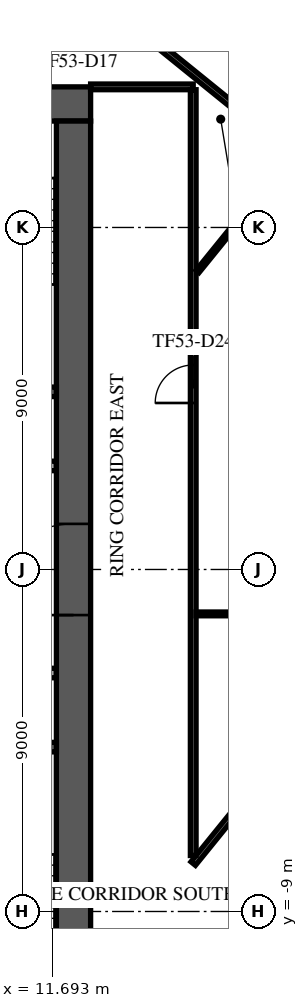
"""IFC4 building model, lengths in metres.
Left out: names, types, materials, properties, quantities, classifications, styles, units other than length and angle.
Written with IfcOpenShell. Run it as: python <this file> out.ifc"""

import sys

from ifc_helpers import new_model, si_unit, direction, frame, frame_2d, origin, place, context, subcontext, project, spatial, rectangle, extrude, element, fill, save


model = new_model("IFC4")
c1 = context("Model", 3, precision=1e-05, world=origin(), true_north=direction((0.0, 1.0)))
c2 = subcontext(c1, "Body", "Model", "MODEL_VIEW")
j1 = project(units=[si_unit("LENGTHUNIT", "METRE"), si_unit("PLANEANGLEUNIT", "RADIAN")], contexts=[c1])
p1 = place(None, origin())
s1 = spatial("IfcSite", under=j1, at=p1, CompositionType="ELEMENT")
p2 = place(p1, origin())
s2 = spatial("IfcBuilding", under=s1, at=p2, CompositionType="ELEMENT")
p3 = place(p2, frame((0.0, 0.0, 225.3)))
s3 = spatial("IfcBuildingStorey", under=s2, at=p3, CompositionType="ELEMENT", Elevation=225.3)
p4 = place(p3, frame((-12.7, 12.25, 0.0), z_axis=(0.0, 0.0, 1.0), x_axis=(1.0, 0.0, 0.0)))
e1 = element("IfcWall", 1, at=p4, inside=s3, PredefinedType="SHEAR", context=c2, shape_type="SweptSolid", body=[
    extrude(rectangle(XDim=25.4, YDim=0.9, at=frame_2d((12.7, 0.0))), origin(), (0.0, 0.0, 1.0), 3.62),
])
p5 = place(p4, frame((11.5, 0.0, 0.0)))
e2 = element("IfcOpeningElement", 2, at=p5, cuts=e1, PredefinedType="OPENING", context=c2, shape_type="SweptSolid", body=[
    extrude(rectangle(XDim=2.4, YDim=2.4, at=frame_2d((1.2, 1.2))), frame((0.0, 0.46, 0.0), z_axis=(0.0, -1.0, 0.0), x_axis=(1.0, 0.0, 0.0)), (0.0, 0.0, 1.0), 0.92),
])
p6 = place(p4, frame((22.325, 0.0, 0.0)))
e3 = element("IfcOpeningElement", 3, at=p6, cuts=e1, PredefinedType="OPENING", context=c2, shape_type="SweptSolid", body=[
    extrude(rectangle(XDim=1.2, YDim=2.1, at=frame_2d((0.6, 1.05))), frame((0.0, 0.46, 0.0), z_axis=(0.0, -1.0, 0.0), x_axis=(1.0, 0.0, 0.0)), (0.0, 0.0, 1.0), 0.92),
])
p7 = place(p4, frame((1.3, 0.0, 0.0)))
e4 = element("IfcOpeningElement", 4, at=p7, cuts=e1, PredefinedType="OPENING", context=c2, shape_type="SweptSolid", body=[
    extrude(rectangle(XDim=1.0, YDim=2.1, at=frame_2d((0.5, 1.05))), frame((0.0, 0.46, 0.0), z_axis=(0.0, -1.0, 0.0), x_axis=(1.0, 0.0, 0.0)), (0.0, 0.0, 1.0), 0.92),
])
p8 = place(p3, frame((12.25, -11.8, 0.0), z_axis=(0.0, 0.0, 1.0), x_axis=(0.0, 1.0, 0.0)))
e5 = element("IfcWall", 5, at=p8, inside=s3, PredefinedType="SHEAR", context=c2, shape_type="SweptSolid", body=[
    extrude(rectangle(XDim=23.6, YDim=0.9, at=frame_2d((11.8, 0.0))), origin(), (0.0, 0.0, 1.0), 3.62),
])
p9 = place(p8, frame((10.6, 0.0, 0.0)))
e6 = element("IfcOpeningElement", 6, at=p9, cuts=e5, PredefinedType="OPENING", context=c2, shape_type="SweptSolid", body=[
    extrude(rectangle(XDim=2.4, YDim=2.4, at=frame_2d((1.2, 1.2))), frame((0.0, 0.46, 0.0), z_axis=(0.0, -1.0, 0.0), x_axis=(1.0, 0.0, 0.0)), (0.0, 0.0, 1.0), 0.92),
])
for number, where, z_axis, x_axis in (
    (7, (8.65, 4.675, 0.0), (0.0, 0.0, 1.0), (1.0, 0.0, 0.0)),
    (8, (8.65, -4.675, 0.0), (0.0, 0.0, 1.0), (1.0, 0.0, 0.0)),
):
    element("IfcWall", number, at=place(p3, frame(where, z_axis=z_axis, x_axis=x_axis)), inside=s3, PredefinedType="SOLIDWALL", context=c2, shape_type="SweptSolid", body=[
        extrude(rectangle(XDim=3.15, YDim=0.25, at=frame_2d((1.575, 0.0))), origin(), (0.0, 0.0, 1.0), 3.62),
    ])
p10 = place(p3, frame((5.63, -2.725, 0.0), z_axis=(0.0, 0.0, 1.0), x_axis=(1.0, 0.0, 0.0)))
e9 = element("IfcWall", 9, at=p10, inside=s3, PredefinedType="PARTITIONING", context=c2, shape_type="SweptSolid", body=[
    extrude(rectangle(XDim=6.165, YDim=0.25, at=frame_2d((3.083, 0.0))), origin(), (0.0, 0.0, 1.0), 3.62),
])
p11 = place(p10, frame((0.745, 0.0, 0.0)))
e10 = element("IfcOpeningElement", 10, at=p11, cuts=e9, PredefinedType="OPENING", context=c2, shape_type="SweptSolid", body=[
    extrude(rectangle(XDim=1.0, YDim=2.1, at=frame_2d((0.5, 1.05))), frame((0.0, 0.135, 0.0), z_axis=(0.0, -1.0, 0.0), x_axis=(1.0, 0.0, 0.0)), (0.0, 0.0, 1.0), 0.27),
])
p12 = place(p10, frame((3.92, 0.0, 0.0)))
e11 = element("IfcOpeningElement", 11, at=p12, cuts=e9, PredefinedType="OPENING", context=c2, shape_type="SweptSolid", body=[
    extrude(rectangle(XDim=0.9, YDim=2.1, at=frame_2d((0.45, 1.05))), frame((0.0, 0.135, 0.0), z_axis=(0.0, -1.0, 0.0), x_axis=(1.0, 0.0, 0.0)), (0.0, 0.0, 1.0), 0.27),
])
p13 = place(p3, frame((8.38, 2.725, 0.0), z_axis=(0.0, 0.0, 1.0), x_axis=(1.0, 0.0, 0.0)))
e12 = element("IfcWall", 12, at=p13, inside=s3, PredefinedType="PARTITIONING", context=c2, shape_type="SweptSolid", body=[
    extrude(rectangle(XDim=3.415, YDim=0.25, at=frame_2d((1.708, 0.0))), origin(), (0.0, 0.0, 1.0), 3.62),
])
p14 = place(p13, frame((1.17, 0.0, 0.0)))
e13 = element("IfcOpeningElement", 13, at=p14, cuts=e12, PredefinedType="OPENING", context=c2, shape_type="SweptSolid", body=[
    extrude(rectangle(XDim=0.9, YDim=2.1, at=frame_2d((0.45, 1.05))), frame((0.0, 0.135, 0.0), z_axis=(0.0, -1.0, 0.0), x_axis=(1.0, 0.0, 0.0)), (0.0, 0.0, 1.0), 0.27),
])
p15 = place(p3, frame((3.777, -34.584, 0.0), z_axis=(0.0, 0.0, 1.0), x_axis=(0.629323778295, 0.777143218508, 0.0)))
e14 = element("IfcWall", 14, at=p15, inside=s3, PredefinedType="STANDARD", context=c2, shape_type="SweptSolid", body=[
    extrude(rectangle(XDim=49.0, YDim=0.6, at=frame_2d((24.5, 0.0))), origin(), (0.0, 0.0, 1.0), 3.62),
])
p16 = place(p15, frame((1.227, 0.0, 0.9)))
e15 = element("IfcOpeningElement", 15, at=p16, cuts=e14, PredefinedType="OPENING", context=c2, shape_type="SweptSolid", body=[
    extrude(rectangle(XDim=2.0, YDim=2.1, at=frame_2d((1.0, 1.05))), frame((0.0, 0.31, 0.0), z_axis=(0.0, -1.0, 0.0), x_axis=(1.0, 0.0, 0.0)), (0.0, 0.0, 1.0), 0.62),
])
p17 = place(p15, frame((5.682, 0.0, 0.9)))
e16 = element("IfcOpeningElement", 16, at=p17, cuts=e14, PredefinedType="OPENING", context=c2, shape_type="SweptSolid", body=[
    extrude(rectangle(XDim=2.0, YDim=2.1, at=frame_2d((1.0, 1.05))), frame((0.0, 0.31, 0.0), z_axis=(0.0, -1.0, 0.0), x_axis=(1.0, 0.0, 0.0)), (0.0, 0.0, 1.0), 0.62),
])
p18 = place(p15, frame((10.136, 0.0, 0.9)))
e17 = element("IfcOpeningElement", 17, at=p18, cuts=e14, PredefinedType="OPENING", context=c2, shape_type="SweptSolid", body=[
    extrude(rectangle(XDim=2.0, YDim=2.1, at=frame_2d((1.0, 1.05))), frame((0.0, 0.31, 0.0), z_axis=(0.0, -1.0, 0.0), x_axis=(1.0, 0.0, 0.0)), (0.0, 0.0, 1.0), 0.62),
])
p19 = place(p15, frame((14.591, 0.0, 0.9)))
e18 = element("IfcOpeningElement", 18, at=p19, cuts=e14, PredefinedType="OPENING", context=c2, shape_type="SweptSolid", body=[
    extrude(rectangle(XDim=2.0, YDim=2.1, at=frame_2d((1.0, 1.05))), frame((0.0, 0.31, 0.0), z_axis=(0.0, -1.0, 0.0), x_axis=(1.0, 0.0, 0.0)), (0.0, 0.0, 1.0), 0.62),
])
p20 = place(p15, frame((19.045, 0.0, 0.9)))
e19 = element("IfcOpeningElement", 19, at=p20, cuts=e14, PredefinedType="OPENING", context=c2, shape_type="SweptSolid", body=[
    extrude(rectangle(XDim=2.0, YDim=2.1, at=frame_2d((1.0, 1.05))), frame((0.0, 0.31, 0.0), z_axis=(0.0, -1.0, 0.0), x_axis=(1.0, 0.0, 0.0)), (0.0, 0.0, 1.0), 0.62),
])
p21 = place(p15, frame((23.5, 0.0, 0.9)))
e20 = element("IfcOpeningElement", 20, at=p21, cuts=e14, PredefinedType="OPENING", context=c2, shape_type="SweptSolid", body=[
    extrude(rectangle(XDim=2.0, YDim=2.1, at=frame_2d((1.0, 1.05))), frame((0.0, 0.31, 0.0), z_axis=(0.0, -1.0, 0.0), x_axis=(1.0, 0.0, 0.0)), (0.0, 0.0, 1.0), 0.62),
])
p22 = place(p15, frame((27.955, 0.0, 0.9)))
e21 = element("IfcOpeningElement", 21, at=p22, cuts=e14, PredefinedType="OPENING", context=c2, shape_type="SweptSolid", body=[
    extrude(rectangle(XDim=2.0, YDim=2.1, at=frame_2d((1.0, 1.05))), frame((0.0, 0.31, 0.0), z_axis=(0.0, -1.0, 0.0), x_axis=(1.0, 0.0, 0.0)), (0.0, 0.0, 1.0), 0.62),
])
p23 = place(p15, frame((32.409, 0.0, 0.9)))
e22 = element("IfcOpeningElement", 22, at=p23, cuts=e14, PredefinedType="OPENING", context=c2, shape_type="SweptSolid", body=[
    extrude(rectangle(XDim=2.0, YDim=2.1, at=frame_2d((1.0, 1.05))), frame((0.0, 0.31, 0.0), z_axis=(0.0, -1.0, 0.0), x_axis=(1.0, 0.0, 0.0)), (0.0, 0.0, 1.0), 0.62),
])
p24 = place(p15, frame((36.864, 0.0, 0.9)))
e23 = element("IfcOpeningElement", 23, at=p24, cuts=e14, PredefinedType="OPENING", context=c2, shape_type="SweptSolid", body=[
    extrude(rectangle(XDim=2.0, YDim=2.1, at=frame_2d((1.0, 1.05))), frame((0.0, 0.31, 0.0), z_axis=(0.0, -1.0, 0.0), x_axis=(1.0, 0.0, 0.0)), (0.0, 0.0, 1.0), 0.62),
])
p25 = place(p15, frame((41.318, 0.0, 0.9)))
e24 = element("IfcOpeningElement", 24, at=p25, cuts=e14, PredefinedType="OPENING", context=c2, shape_type="SweptSolid", body=[
    extrude(rectangle(XDim=2.0, YDim=2.1, at=frame_2d((1.0, 1.05))), frame((0.0, 0.31, 0.0), z_axis=(0.0, -1.0, 0.0), x_axis=(1.0, 0.0, 0.0)), (0.0, 0.0, 1.0), 0.62),
])
p26 = place(p15, frame((45.773, 0.0, 0.9)))
e25 = element("IfcOpeningElement", 25, at=p26, cuts=e14, PredefinedType="OPENING", context=c2, shape_type="SweptSolid", body=[
    extrude(rectangle(XDim=2.0, YDim=2.1, at=frame_2d((1.0, 1.05))), frame((0.0, 0.31, 0.0), z_axis=(0.0, -1.0, 0.0), x_axis=(1.0, 0.0, 0.0)), (0.0, 0.0, 1.0), 0.62),
])
p27 = place(p3, frame((33.845, 10.81, 0.0), z_axis=(0.0, 0.0, 1.0), x_axis=(-0.777145437972, 0.629321037499, 0.0)))
e26 = element("IfcWall", 26, at=p27, inside=s3, PredefinedType="STANDARD", context=c2, shape_type="SweptSolid", body=[
    extrude(rectangle(XDim=39.0, YDim=0.6, at=frame_2d((19.5, 0.0))), origin(), (0.0, 0.0, 1.0), 3.62),
])
p28 = place(p27, frame((1.217, 0.0, 0.9)))
e27 = element("IfcOpeningElement", 27, at=p28, cuts=e26, PredefinedType="OPENING", context=c2, shape_type="SweptSolid", body=[
    extrude(rectangle(XDim=1.9, YDim=2.1, at=frame_2d((0.95, 1.05))), frame((0.0, 0.31, 0.0), z_axis=(0.0, -1.0, 0.0), x_axis=(1.0, 0.0, 0.0)), (0.0, 0.0, 1.0), 0.62),
])
p29 = place(p27, frame((5.55, 0.0, 0.9)))
e28 = element("IfcOpeningElement", 28, at=p29, cuts=e26, PredefinedType="OPENING", context=c2, shape_type="SweptSolid", body=[
    extrude(rectangle(XDim=1.9, YDim=2.1, at=frame_2d((0.95, 1.05))), frame((0.0, 0.31, 0.0), z_axis=(0.0, -1.0, 0.0), x_axis=(1.0, 0.0, 0.0)), (0.0, 0.0, 1.0), 0.62),
])
p30 = place(p27, frame((9.883, 0.0, 0.9)))
e29 = element("IfcOpeningElement", 29, at=p30, cuts=e26, PredefinedType="OPENING", context=c2, shape_type="SweptSolid", body=[
    extrude(rectangle(XDim=1.9, YDim=2.1, at=frame_2d((0.95, 1.05))), frame((0.0, 0.31, 0.0), z_axis=(0.0, -1.0, 0.0), x_axis=(1.0, 0.0, 0.0)), (0.0, 0.0, 1.0), 0.62),
])
p31 = place(p27, frame((14.217, 0.0, 0.9)))
e30 = element("IfcOpeningElement", 30, at=p31, cuts=e26, PredefinedType="OPENING", context=c2, shape_type="SweptSolid", body=[
    extrude(rectangle(XDim=1.9, YDim=2.1, at=frame_2d((0.95, 1.05))), frame((0.0, 0.31, 0.0), z_axis=(0.0, -1.0, 0.0), x_axis=(1.0, 0.0, 0.0)), (0.0, 0.0, 1.0), 0.62),
])
p32 = place(p27, frame((18.55, 0.0, 0.9)))
e31 = element("IfcOpeningElement", 31, at=p32, cuts=e26, PredefinedType="OPENING", context=c2, shape_type="SweptSolid", body=[
    extrude(rectangle(XDim=1.9, YDim=2.1, at=frame_2d((0.95, 1.05))), frame((0.0, 0.31, 0.0), z_axis=(0.0, -1.0, 0.0), x_axis=(1.0, 0.0, 0.0)), (0.0, 0.0, 1.0), 0.62),
])
p33 = place(p27, frame((22.883, 0.0, 0.9)))
e32 = element("IfcOpeningElement", 32, at=p33, cuts=e26, PredefinedType="OPENING", context=c2, shape_type="SweptSolid", body=[
    extrude(rectangle(XDim=1.9, YDim=2.1, at=frame_2d((0.95, 1.05))), frame((0.0, 0.31, 0.0), z_axis=(0.0, -1.0, 0.0), x_axis=(1.0, 0.0, 0.0)), (0.0, 0.0, 1.0), 0.62),
])
p34 = place(p27, frame((27.217, 0.0, 0.9)))
e33 = element("IfcOpeningElement", 33, at=p34, cuts=e26, PredefinedType="OPENING", context=c2, shape_type="SweptSolid", body=[
    extrude(rectangle(XDim=1.9, YDim=2.1, at=frame_2d((0.95, 1.05))), frame((0.0, 0.31, 0.0), z_axis=(0.0, -1.0, 0.0), x_axis=(1.0, 0.0, 0.0)), (0.0, 0.0, 1.0), 0.62),
])
p35 = place(p27, frame((31.55, 0.0, 0.9)))
e34 = element("IfcOpeningElement", 34, at=p35, cuts=e26, PredefinedType="OPENING", context=c2, shape_type="SweptSolid", body=[
    extrude(rectangle(XDim=1.9, YDim=2.1, at=frame_2d((0.95, 1.05))), frame((0.0, 0.31, 0.0), z_axis=(0.0, -1.0, 0.0), x_axis=(1.0, 0.0, 0.0)), (0.0, 0.0, 1.0), 0.62),
])
p36 = place(p27, frame((35.883, 0.0, 0.9)))
e35 = element("IfcOpeningElement", 35, at=p36, cuts=e26, PredefinedType="OPENING", context=c2, shape_type="SweptSolid", body=[
    extrude(rectangle(XDim=1.9, YDim=2.1, at=frame_2d((0.95, 1.05))), frame((0.0, 0.31, 0.0), z_axis=(0.0, -1.0, 0.0), x_axis=(1.0, 0.0, 0.0)), (0.0, 0.0, 1.0), 0.62),
])
p37 = place(p3, frame((3.18, -26.643, 0.0), z_axis=(0.0, 0.0, 1.0), x_axis=(0.629322822444, 0.777143992547, 0.0)))
e36 = element("IfcWall", 36, at=p37, inside=s3, PredefinedType="PARTITIONING", context=c2, shape_type="SweptSolid", body=[
    extrude(rectangle(XDim=37.483, YDim=0.15, at=frame_2d((18.741, 0.0))), origin(), (0.0, 0.0, 1.0), 3.17),
])
p38 = place(p37, frame((6.346, 0.0, 0.0)))
e37 = element("IfcOpeningElement", 37, at=p38, cuts=e36, PredefinedType="OPENING", context=c2, shape_type="SweptSolid", body=[
    extrude(rectangle(XDim=1.0, YDim=2.1, at=frame_2d((0.5, 1.05))), frame((0.0, 0.085, 0.0), z_axis=(0.0, -1.0, 0.0), x_axis=(1.0, 0.0, 0.0)), (0.0, 0.0, 1.0), 0.17),
])
p39 = place(p37, frame((16.452, 0.0, 0.0)))
e38 = element("IfcOpeningElement", 38, at=p39, cuts=e36, PredefinedType="OPENING", context=c2, shape_type="SweptSolid", body=[
    extrude(rectangle(XDim=1.0, YDim=2.1, at=frame_2d((0.5, 1.05))), frame((0.0, 0.085, 0.0), z_axis=(0.0, -1.0, 0.0), x_axis=(1.0, 0.0, 0.0)), (0.0, 0.0, 1.0), 0.17),
])
p40 = place(p37, frame((23.4, 0.0, 0.0)))
e39 = element("IfcOpeningElement", 39, at=p40, cuts=e36, PredefinedType="OPENING", context=c2, shape_type="SweptSolid", body=[
    extrude(rectangle(XDim=1.0, YDim=2.1, at=frame_2d((0.5, 1.05))), frame((0.0, 0.085, 0.0), z_axis=(0.0, -1.0, 0.0), x_axis=(1.0, 0.0, 0.0)), (0.0, 0.0, 1.0), 0.17),
])
p41 = place(p3, frame((3.616, 25.688, 0.0), z_axis=(0.0, 0.0, 1.0), x_axis=(0.777137029952, -0.62933142038, 0.0)))
e40 = element("IfcWall", 40, at=p41, inside=s3, PredefinedType="PARTITIONING", context=c2, shape_type="SweptSolid", body=[
    extrude(rectangle(XDim=26.785, YDim=0.15, at=frame_2d((13.393, 0.0))), origin(), (0.0, 0.0, 1.0), 3.17),
])
p42 = place(p41, frame((12.682, 0.0, 0.0)))
e41 = element("IfcOpeningElement", 41, at=p42, cuts=e40, PredefinedType="OPENING", context=c2, shape_type="SweptSolid", body=[
    extrude(rectangle(XDim=1.0, YDim=2.1, at=frame_2d((0.5, 1.05))), frame((0.0, 0.085, 0.0), z_axis=(0.0, -1.0, 0.0), x_axis=(1.0, 0.0, 0.0)), (0.0, 0.0, 1.0), 0.17),
])
p43 = place(p41, frame((16.597, 0.0, 0.0)))
e42 = element("IfcOpeningElement", 42, at=p43, cuts=e40, PredefinedType="OPENING", context=c2, shape_type="SweptSolid", body=[
    extrude(rectangle(XDim=1.0, YDim=2.1, at=frame_2d((0.5, 1.05))), frame((0.0, 0.085, 0.0), z_axis=(0.0, -1.0, 0.0), x_axis=(1.0, 0.0, 0.0)), (0.0, 0.0, 1.0), 0.17),
])
p44 = place(p3, frame((10.553, 13.672, 0.0), z_axis=(0.0, 0.0, 1.0), x_axis=(0.629534094475, 0.776972859174, 0.0)))
e43 = element("IfcWall", 43, at=p44, inside=s3, PredefinedType="PARTITIONING", context=c2, shape_type="SweptSolid", body=[
    extrude(rectangle(XDim=2.572, YDim=0.15, at=frame_2d((1.286, 0.0))), origin(), (0.0, 0.0, 1.0), 3.17),
])
p45 = place(p44, frame((0.55, 0.0, 0.0)))
e44 = element("IfcOpeningElement", 44, at=p45, cuts=e43, PredefinedType="OPENING", context=c2, shape_type="SweptSolid", body=[
    extrude(rectangle(XDim=1.0, YDim=2.1, at=frame_2d((0.5, 1.05))), frame((0.0, 0.085, 0.0), z_axis=(0.0, -1.0, 0.0), x_axis=(1.0, 0.0, 0.0)), (0.0, 0.0, 1.0), 0.17),
])
p46 = place(p3, frame((12.172, 15.671, 0.0), z_axis=(0.0, 0.0, 1.0), x_axis=(0.777123609621, -0.629347992266, 0.0)))
e45 = element("IfcWall", 45, at=p46, inside=s3, PredefinedType="PARTITIONING", context=c2, shape_type="SweptSolid", body=[
    extrude(rectangle(XDim=13.833, YDim=0.15, at=frame_2d((6.917, 0.0))), origin(), (0.0, 0.0, 1.0), 3.17),
])
p47 = place(p46, frame((11.324, 0.0, 0.0)))
e46 = element("IfcOpeningElement", 46, at=p47, cuts=e45, PredefinedType="OPENING", context=c2, shape_type="SweptSolid", body=[
    extrude(rectangle(XDim=1.8, YDim=2.1, at=frame_2d((0.9, 1.05))), frame((0.0, 0.085, 0.0), z_axis=(0.0, -1.0, 0.0), x_axis=(1.0, 0.0, 0.0)), (0.0, 0.0, 1.0), 0.17),
])
p48 = place(p3, frame((12.7, 12.7, 0.0), z_axis=(0.0, 0.0, 1.0), x_axis=(1.0, 0.0, 0.0)))
e47 = element("IfcWall", 47, at=p48, inside=s3, PredefinedType="PARTITIONING", context=c2, shape_type="SweptSolid", body=[
    extrude(rectangle(XDim=2.7, YDim=0.15, at=frame_2d((1.35, 0.0))), origin(), (0.0, 0.0, 1.0), 3.17),
])
p49 = place(p3, frame((15.4, -7.739, 0.0), z_axis=(0.0, 0.0, 1.0), x_axis=(0.629348532184, 0.777123172373, 0.0)))
e48 = element("IfcWall", 48, at=p49, inside=s3, PredefinedType="PARTITIONING", context=c2, shape_type="SweptSolid", body=[
    extrude(rectangle(XDim=8.317, YDim=0.15, at=frame_2d((4.158, 0.0))), origin(), (0.0, 0.0, 1.0), 3.17),
])
p50 = place(p49, frame((5.8, 0.0, 0.0)))
e49 = element("IfcOpeningElement", 49, at=p50, cuts=e48, PredefinedType="OPENING", context=c2, shape_type="SweptSolid", body=[
    extrude(rectangle(XDim=1.0, YDim=2.1, at=frame_2d((0.5, 1.05))), frame((0.0, 0.085, 0.0), z_axis=(0.0, -1.0, 0.0), x_axis=(1.0, 0.0, 0.0)), (0.0, 0.0, 1.0), 0.17),
])
p51 = place(p3, frame((15.4, -7.527, 0.0), z_axis=(0.0, 0.0, 1.0), x_axis=(0.0, 1.0, 0.0)))
e50 = element("IfcWall", 50, at=p51, inside=s3, PredefinedType="PARTITIONING", context=c2, shape_type="SweptSolid", body=[
    extrude(rectangle(XDim=20.152, YDim=0.15, at=frame_2d((10.076, 0.0))), origin(), (0.0, 0.0, 1.0), 3.17),
])
p52 = place(p51, frame((11.908, 0.0, 0.0)))
e51 = element("IfcOpeningElement", 51, at=p52, cuts=e50, PredefinedType="OPENING", context=c2, shape_type="SweptSolid", body=[
    extrude(rectangle(XDim=1.0, YDim=2.1, at=frame_2d((0.5, 1.05))), frame((0.0, 0.085, 0.0), z_axis=(0.0, -1.0, 0.0), x_axis=(1.0, 0.0, 0.0)), (0.0, 0.0, 1.0), 0.17),
])
p53 = place(p3, frame((15.475, -1.169, 0.0), z_axis=(0.0, 0.0, 1.0), x_axis=(1.0, 0.0, 0.0)))
e52 = element("IfcWall", 52, at=p53, inside=s3, PredefinedType="PARTITIONING", context=c2, shape_type="SweptSolid", body=[
    extrude(rectangle(XDim=5.027, YDim=0.1, at=frame_2d((2.513, 0.0))), origin(), (0.0, 0.0, 1.0), 3.17),
])
p54 = place(p3, frame((15.514, 7.843, 0.0), z_axis=(0.0, 0.0, 1.0), x_axis=(0.629311514858, 0.777153149172, 0.0)))
e53 = element("IfcWall", 53, at=p54, inside=s3, PredefinedType="PARTITIONING", context=c2, shape_type="SweptSolid", body=[
    extrude(rectangle(XDim=3.906, YDim=0.1, at=frame_2d((1.953, 0.0))), origin(), (0.0, 0.0, 1.0), 3.17),
])
p55 = place(p9, origin())
e54 = element("IfcDoor", 54, at=p55, inside=s3, OperationType="SINGLE_SWING_LEFT", PredefinedType="DOOR", context=c2, shape_type="SweptSolid", body=[
    extrude(rectangle(XDim=2.4, YDim=2.4, at=frame_2d((1.2, 1.2))), frame((0.0, 0.025, 0.0), z_axis=(0.0, -1.0, 0.0), x_axis=(1.0, 0.0, 0.0)), (0.0, 0.0, 1.0), 0.05),
])
fill(e6, e54)
p56 = place(p52, frame((1.0, 0.0, 0.0), z_axis=(0.0, 0.0, 1.0), x_axis=(-1.0, 0.0, 0.0)))
e55 = element("IfcDoor", 55, at=p56, inside=s3, OperationType="SINGLE_SWING_RIGHT", PredefinedType="DOOR", context=c2, shape_type="SweptSolid", body=[
    extrude(rectangle(XDim=1.0, YDim=2.1, at=frame_2d((0.5, 1.05))), frame((0.0, 0.025, 0.0), z_axis=(0.0, -1.0, 0.0), x_axis=(1.0, 0.0, 0.0)), (0.0, 0.0, 1.0), 0.05),
])
fill(e51, e55)
save(model, sys.argv[1])
